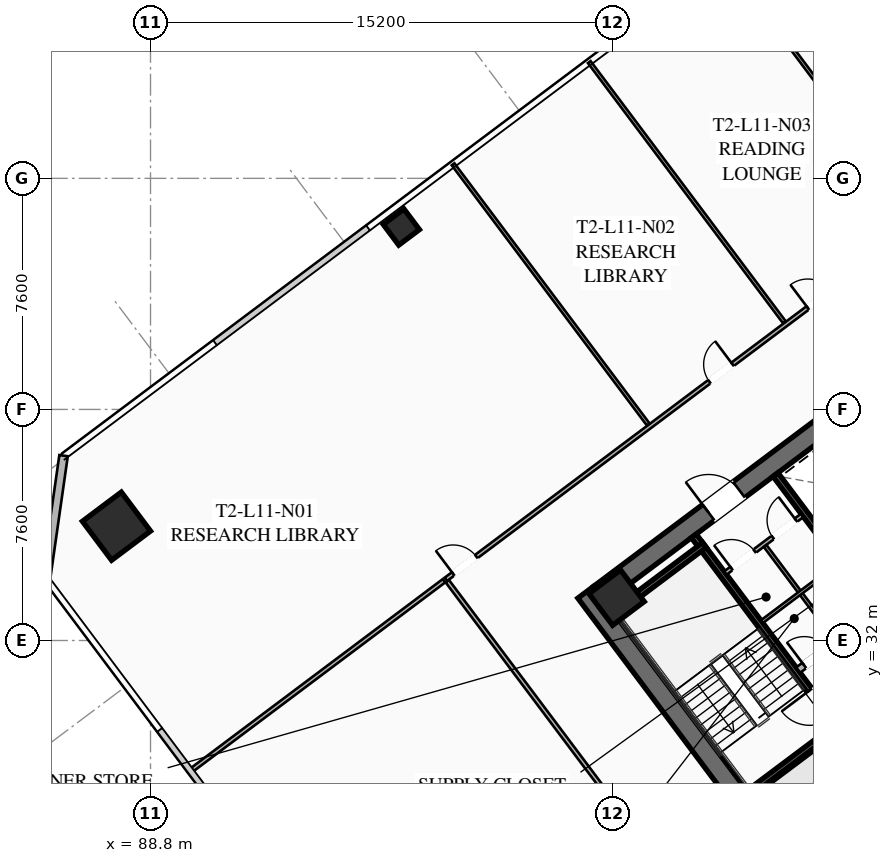
"""IFC4 building model, lengths in metres.
Left out: names, types, materials, properties, quantities, classifications, styles, units other than length and angle.
Written with IfcOpenShell. Run it as: python <this file> out.ifc"""

import sys

from ifc_helpers import new_model, si_unit, direction, frame, frame_2d, origin, origin_2d, place, context, subcontext, project, spatial, rectangle, hollow_rectangle, extrude, element, fill, save


model = new_model("IFC4")
c1 = context("Model", 3, precision=1e-05, world=origin(), true_north=direction((0.0, 1.0)))
c2 = subcontext(c1, "Body", "Model", "MODEL_VIEW")
j1 = project(units=[si_unit("LENGTHUNIT", "METRE"), si_unit("PLANEANGLEUNIT", "RADIAN")], contexts=[c1])
p1 = place(None, origin())
s1 = spatial("IfcSite", under=j1, at=p1, CompositionType="ELEMENT")
p2 = place(p1, origin())
s2 = spatial("IfcBuilding", under=s1, at=p2, CompositionType="ELEMENT")
p3 = place(p2, frame((0.0, 0.0, 45.9)))
s3 = spatial("IfcBuildingStorey", under=s2, at=p3, CompositionType="ELEMENT", Elevation=45.9)
p4 = place(p3, frame((112.476, 21.107, 0.0), z_axis=(0.0, 0.0, 1.0), x_axis=(-0.600005007985, 0.799996243986, 0.0)))
e1 = element("IfcWall", 1, at=p4, inside=s3, PredefinedType="SHEAR", context=c2, shape_type="SweptSolid", body=[
    extrude(rectangle(XDim=15.6, YDim=0.65, at=frame_2d((7.8, 0.0))), origin(), (0.0, 0.0, 1.0), 3.55),
])
p5 = place(p3, frame((103.571, 33.522, 0.0), z_axis=(0.0, 0.0, 1.0), x_axis=(0.799998028465, 0.600002628705, 0.0)))
e2 = element("IfcWall", 2, at=p5, inside=s3, PredefinedType="SHEAR", context=c2, shape_type="SweptSolid", body=[
    extrude(rectangle(XDim=14.86, YDim=0.65, at=frame_2d((7.43, 0.0))), origin(), (0.0, 0.0, 1.0), 3.55),
])
p6 = place(p5, frame((4.48, 0.0, 0.0)))
e3 = element("IfcOpeningElement", 3, at=p6, cuts=e2, PredefinedType="OPENING", context=c2, shape_type="SweptSolid", body=[
    extrude(rectangle(XDim=1.25, YDim=2.25, at=frame_2d((0.625, 1.125))), frame((0.0, 0.335, 0.0), z_axis=(0.0, -1.0, 0.0), x_axis=(1.0, 0.0, 0.0)), (0.0, 0.0, 1.0), 0.67),
])
p7 = place(p5, frame((9.53, 0.0, 0.0)))
e4 = element("IfcOpeningElement", 4, at=p7, cuts=e2, PredefinedType="OPENING", context=c2, shape_type="SweptSolid", body=[
    extrude(rectangle(XDim=1.25, YDim=2.25, at=frame_2d((0.625, 1.125))), frame((0.0, 0.335, 0.0), z_axis=(0.0, -1.0, 0.0), x_axis=(1.0, 0.0, 0.0)), (0.0, 0.0, 1.0), 0.67),
])
p8 = place(p3, frame((104.13, 33.41, 0.0), z_axis=(0.0, 0.0, 1.0), x_axis=(0.799999996291, 0.600000004945, 0.0)))
e5 = element("IfcColumn", 5, at=p8, inside=s3, PredefinedType="COLUMN", context=c2, shape_type="SweptSolid", body=[
    extrude(hollow_rectangle(XDim=1.3, YDim=1.3, WallThickness=0.05, at=origin_2d()), origin(), (0.0, 0.0, 1.0), 3.35),
])
p9 = place(p3, frame((87.68, 35.76, 0.0), z_axis=(0.0, 0.0, 1.0), x_axis=(0.799999996291, 0.600000004945, 0.0)))
e6 = element("IfcColumn", 6, at=p9, inside=s3, PredefinedType="COLUMN", context=c2, shape_type="SweptSolid", body=[
    extrude(hollow_rectangle(XDim=1.6, YDim=1.6, WallThickness=0.06, at=origin_2d()), origin(), (0.0, 0.0, 1.0), 3.35),
])
p10 = place(p3, frame((97.05, 45.6, 0.0), z_axis=(0.0, 0.0, 1.0), x_axis=(0.799999996291, 0.600000004945, 0.0)))
e7 = element("IfcColumn", 7, at=p10, inside=s3, PredefinedType="COLUMN", context=c2, shape_type="SweptSolid", body=[
    extrude(hollow_rectangle(XDim=0.85, YDim=0.85, WallThickness=0.035, at=origin_2d()), origin(), (0.0, 0.0, 1.0), 3.35),
])
p11 = place(p3, frame((85.36, 34.02, 0.0), z_axis=(0.0, 0.0, 1.0), x_axis=(0.14137968631, 0.989955445613, 0.0)))
e8 = element("IfcWall", 8, at=p11, inside=s3, PredefinedType="SOLIDWALL", context=c2, shape_type="SweptSolid", body=[
    extrude(rectangle(XDim=4.101, YDim=0.28, at=frame_2d((2.051, 0.0))), origin(), (0.0, 0.0, 1.0), 3.35),
])
p12 = place(p3, frame((111.44, 29.08, 0.0), z_axis=(0.0, 0.0, 1.0), x_axis=(-0.600009827119, 0.799992629566, 0.0)))
e9 = element("IfcWall", 9, at=p12, inside=s3, PredefinedType="SHEAR", context=c2, shape_type="SweptSolid", body=[
    extrude(rectangle(XDim=7.95, YDim=0.2, at=frame_2d((3.975, 0.0))), origin(), (0.0, 0.0, 1.0), 3.35),
])
p13 = place(p12, frame((0.45, 0.0, 0.0)))
e10 = element("IfcOpeningElement", 10, at=p13, cuts=e9, PredefinedType="OPENING", context=c2, shape_type="SweptSolid", body=[
    extrude(rectangle(XDim=1.15, YDim=2.2, at=frame_2d((0.575, 1.1))), frame((0.0, 0.11, 0.0), z_axis=(0.0, -1.0, 0.0), x_axis=(1.0, 0.0, 0.0)), (0.0, 0.0, 1.0), 0.22),
])
for number, where, z_axis, x_axis in (
    (11, (108.476, 26.982, 0.0), (0.0, 0.0, 1.0), (0.8, 0.6, 0.0)),
    (12, (104.036, 32.902, 0.0), (0.0, 0.0, 1.0), (0.8, 0.6, 0.0)),
):
    element("IfcWall", number, at=place(p3, frame(where, z_axis=z_axis, x_axis=x_axis)), inside=s3, PredefinedType="SHEAR", context=c2, shape_type="SweptSolid", body=[
        extrude(rectangle(XDim=3.73, YDim=0.2, at=frame_2d((1.865, 0.0))), origin(), (0.0, 0.0, 1.0), 3.35),
    ])
p14 = place(p3, frame((117.938, 26.016, 0.0), z_axis=(0.0, 0.0, 1.0), x_axis=(-0.600005463273, 0.799995902516, 0.0)))
e13 = element("IfcWall", 13, at=p14, inside=s3, PredefinedType="SHEAR", context=c2, shape_type="SweptSolid", body=[
    extrude(rectangle(XDim=14.3, YDim=0.2, at=frame_2d((7.15, 0.0))), origin(), (0.0, 0.0, 1.0), 3.35),
])
p15 = place(p3, frame((110.104, 31.028, 0.0), z_axis=(0.0, 0.0, 1.0), x_axis=(0.800018601094, 0.59997519774, 0.0)))
e14 = element("IfcWall", 14, at=p15, inside=s3, PredefinedType="SOLIDWALL", context=c2, shape_type="SweptSolid", body=[
    extrude(rectangle(XDim=3.15, YDim=0.22, at=frame_2d((1.575, 0.0))), origin(), (0.0, 0.0, 1.0), 2.703),
])
p16 = place(p15, frame((0.25, 0.0, 0.0)))
e15 = element("IfcOpeningElement", 15, at=p16, cuts=e14, PredefinedType="OPENING", context=c2, shape_type="SweptSolid", body=[
    extrude(rectangle(XDim=0.95, YDim=2.05, at=frame_2d((0.475, 1.025))), frame((0.0, 0.12, 0.0), z_axis=(0.0, -1.0, 0.0), x_axis=(1.0, 0.0, 0.0)), (0.0, 0.0, 1.0), 0.24),
])
p17 = place(p15, frame((1.95, 0.0, 0.0)))
e16 = element("IfcOpeningElement", 16, at=p17, cuts=e14, PredefinedType="OPENING", context=c2, shape_type="SweptSolid", body=[
    extrude(rectangle(XDim=0.95, YDim=2.05, at=frame_2d((0.475, 1.025))), frame((0.0, 0.12, 0.0), z_axis=(0.0, -1.0, 0.0), x_axis=(1.0, 0.0, 0.0)), (0.0, 0.0, 1.0), 0.24),
])
p18 = place(p3, frame((109.688, 25.366, 0.0), z_axis=(0.0, 0.0, 1.0), x_axis=(0.8, 0.6, 0.0)))
e17 = element("IfcWall", 17, at=p18, inside=s3, PredefinedType="SOLIDWALL", context=c2, shape_type="SweptSolid", body=[
    extrude(rectangle(XDim=3.38, YDim=0.2, at=frame_2d((1.69, 0.0))), origin(), (0.0, 0.0, 1.0), 3.35),
])
p19 = place(p3, frame((107.71, 34.22, 0.0), z_axis=(0.0, 0.0, 1.0), x_axis=(0.799981399002, 0.60002480053, 0.0)))
e18 = element("IfcWall", 18, at=p19, inside=s3, PredefinedType="PARTITIONING", context=c2, shape_type="SweptSolid", body=[
    extrude(rectangle(XDim=3.15, YDim=0.135, at=frame_2d((1.575, 0.0))), origin(), (0.0, 0.0, 1.0), 2.703),
])
p20 = place(p19, frame((0.25, 0.0, 0.0)))
e19 = element("IfcOpeningElement", 19, at=p20, cuts=e18, PredefinedType="OPENING", context=c2, shape_type="SweptSolid", body=[
    extrude(rectangle(XDim=0.95, YDim=2.05, at=frame_2d((0.475, 1.025))), frame((0.0, 0.077, 0.0), z_axis=(0.0, -1.0, 0.0), x_axis=(1.0, 0.0, 0.0)), (0.0, 0.0, 1.0), 0.155),
])
p21 = place(p19, frame((1.95, 0.0, 0.0)))
e20 = element("IfcOpeningElement", 20, at=p21, cuts=e18, PredefinedType="OPENING", context=c2, shape_type="SweptSolid", body=[
    extrude(rectangle(XDim=0.95, YDim=2.05, at=frame_2d((0.475, 1.025))), frame((0.0, 0.077, 0.0), z_axis=(0.0, -1.0, 0.0), x_axis=(1.0, 0.0, 0.0)), (0.0, 0.0, 1.0), 0.155),
])
p22 = place(p3, frame((111.296, 32.072, 0.0), z_axis=(0.0, 0.0, 1.0), x_axis=(-0.59995887973, 0.800030838552, 0.0)))
e21 = element("IfcWall", 21, at=p22, inside=s3, PredefinedType="PARTITIONING", context=c2, shape_type="SweptSolid", body=[
    extrude(rectangle(XDim=3.8, YDim=0.11, at=frame_2d((1.9, 0.0))), origin(), (0.0, 0.0, 1.0), 2.703),
])
p23 = place(p3, frame((108.91, 32.62, 0.0), z_axis=(0.0, 0.0, 1.0), x_axis=(0.800018601094, 0.59997519774, 0.0)))
e22 = element("IfcWall", 22, at=p23, inside=s3, PredefinedType="PARTITIONING", context=c2, shape_type="SweptSolid", body=[
    extrude(rectangle(XDim=3.15, YDim=0.11, at=frame_2d((1.575, 0.0))), origin(), (0.0, 0.0, 1.0), 2.703),
])
p24 = place(p3, frame((98.516, 34.012, 0.0), z_axis=(0.0, 0.0, 1.0), x_axis=(0.799998035726, 0.600002619023, 0.0)))
e23 = element("IfcWall", 23, at=p24, inside=s3, PredefinedType="PARTITIONING", context=c2, shape_type="SweptSolid", body=[
    extrude(rectangle(XDim=29.83, YDim=0.135, at=frame_2d((14.915, 0.0))), origin(), (0.0, 0.0, 1.0), 2.703),
])
p25 = place(p24, frame((0.3, 0.0, 0.0)))
e24 = element("IfcOpeningElement", 24, at=p25, cuts=e23, PredefinedType="OPENING", context=c2, shape_type="SweptSolid", body=[
    extrude(rectangle(XDim=0.95, YDim=2.05, at=frame_2d((0.475, 1.025))), frame((0.0, 0.077, 0.0), z_axis=(0.0, -1.0, 0.0), x_axis=(1.0, 0.0, 0.0)), (0.0, 0.0, 1.0), 0.155),
])
p26 = place(p24, frame((10.835, 0.0, 0.0)))
e25 = element("IfcOpeningElement", 25, at=p26, cuts=e23, PredefinedType="OPENING", context=c2, shape_type="SweptSolid", body=[
    extrude(rectangle(XDim=0.95, YDim=2.05, at=frame_2d((0.475, 1.025))), frame((0.0, 0.077, 0.0), z_axis=(0.0, -1.0, 0.0), x_axis=(1.0, 0.0, 0.0)), (0.0, 0.0, 1.0), 0.155),
])
p27 = place(p24, frame((14.879, 0.0, 0.0)))
e26 = element("IfcOpeningElement", 26, at=p27, cuts=e23, PredefinedType="OPENING", context=c2, shape_type="SweptSolid", body=[
    extrude(rectangle(XDim=0.95, YDim=2.05, at=frame_2d((0.475, 1.025))), frame((0.0, 0.077, 0.0), z_axis=(0.0, -1.0, 0.0), x_axis=(1.0, 0.0, 0.0)), (0.0, 0.0, 1.0), 0.155),
])
p28 = place(p24, frame((28.58, 0.0, 0.0)))
e27 = element("IfcOpeningElement", 27, at=p28, cuts=e23, PredefinedType="OPENING", context=c2, shape_type="SweptSolid", body=[
    extrude(rectangle(XDim=0.95, YDim=2.05, at=frame_2d((0.475, 1.025))), frame((0.0, 0.077, 0.0), z_axis=(0.0, -1.0, 0.0), x_axis=(1.0, 0.0, 0.0)), (0.0, 0.0, 1.0), 0.155),
])
p29 = place(p3, frame((105.172, 39.104, 0.0), z_axis=(0.0, 0.0, 1.0), x_axis=(-0.600007301277, 0.79999452399, 0.0)))
e28 = element("IfcWall", 28, at=p29, inside=s3, PredefinedType="PARTITIONING", context=c2, shape_type="SweptSolid", body=[
    extrude(rectangle(XDim=10.7, YDim=0.11, at=frame_2d((5.35, 0.0))), origin(), (0.0, 0.0, 1.0), 2.703),
])
p30 = place(p3, frame((109.652, 42.464, 0.0), z_axis=(0.0, 0.0, 1.0), x_axis=(-0.600018253432, 0.799986309601, 0.0)))
e29 = element("IfcWall", 29, at=p30, inside=s3, PredefinedType="PARTITIONING", context=c2, shape_type="SweptSolid", body=[
    extrude(rectangle(XDim=10.7, YDim=0.11, at=frame_2d((5.35, 0.0))), origin(), (0.0, 0.0, 1.0), 2.703),
])
p31 = place(p3, frame((114.132, 45.824, 0.0), z_axis=(0.0, 0.0, 1.0), x_axis=(-0.600007301277, 0.79999452399, 0.0)))
e30 = element("IfcWall", 30, at=p31, inside=s3, PredefinedType="PARTITIONING", context=c2, shape_type="SweptSolid", body=[
    extrude(rectangle(XDim=10.7, YDim=0.11, at=frame_2d((5.35, 0.0))), origin(), (0.0, 0.0, 1.0), 2.703),
])
p32 = place(p3, frame((111.548, 16.636, 0.0), z_axis=(0.0, 0.0, 1.0), x_axis=(-0.600003610192, 0.799997292343, 0.0)))
e31 = element("IfcWall", 31, at=p32, inside=s3, PredefinedType="PARTITIONING", context=c2, shape_type="SweptSolid", body=[
    extrude(rectangle(XDim=21.64, YDim=0.135, at=frame_2d((10.82, 0.0))), origin(), (0.0, 0.0, 1.0), 2.703),
])
p33 = place(p32, frame((0.3, 0.0, 0.0)))
e32 = element("IfcOpeningElement", 32, at=p33, cuts=e31, PredefinedType="OPENING", context=c2, shape_type="SweptSolid", body=[
    extrude(rectangle(XDim=0.95, YDim=2.05, at=frame_2d((0.475, 1.025))), frame((0.0, 0.077, 0.0), z_axis=(0.0, -1.0, 0.0), x_axis=(1.0, 0.0, 0.0)), (0.0, 0.0, 1.0), 0.155),
])
p34 = place(p3, frame((98.452, 33.964, 0.0), z_axis=(0.0, 0.0, 1.0), x_axis=(-0.799988753532, -0.600014994998, 0.0)))
e33 = element("IfcWall", 33, at=p34, inside=s3, PredefinedType="PARTITIONING", context=c2, shape_type="SweptSolid", body=[
    extrude(rectangle(XDim=10.42, YDim=0.135, at=frame_2d((5.21, 0.0))), origin(), (0.0, 0.0, 1.0), 2.703),
])
p35 = place(p6, origin())
e34 = element("IfcDoor", 34, at=p35, inside=s3, OperationType="SINGLE_SWING_LEFT", PredefinedType="DOOR", context=c2, shape_type="SweptSolid", body=[
    extrude(rectangle(XDim=1.25, YDim=2.25, at=frame_2d((0.625, 1.125))), frame((0.0, 0.025, 0.0), z_axis=(0.0, -1.0, 0.0), x_axis=(1.0, 0.0, 0.0)), (0.0, 0.0, 1.0), 0.05),
])
fill(e3, e34)
p36 = place(p13, origin())
e35 = element("IfcDoor", 35, at=p36, inside=s3, OperationType="SINGLE_SWING_RIGHT", PredefinedType="DOOR", context=c2, shape_type="SweptSolid", body=[
    extrude(rectangle(XDim=1.15, YDim=2.2, at=frame_2d((0.575, 1.1))), frame((0.0, 0.025, 0.0), z_axis=(0.0, -1.0, 0.0), x_axis=(1.0, 0.0, 0.0)), (0.0, 0.0, 1.0), 0.05),
])
fill(e10, e35)
p37 = place(p20, origin())
e36 = element("IfcDoor", 36, at=p37, inside=s3, OperationType="SINGLE_SWING_LEFT", PredefinedType="DOOR", context=c2, shape_type="SweptSolid", body=[
    extrude(rectangle(XDim=0.95, YDim=2.05, at=frame_2d((0.475, 1.025))), frame((0.0, 0.025, 0.0), z_axis=(0.0, -1.0, 0.0), x_axis=(1.0, 0.0, 0.0)), (0.0, 0.0, 1.0), 0.05),
])
fill(e19, e36)
p38 = place(p21, origin())
e37 = element("IfcDoor", 37, at=p38, inside=s3, OperationType="SINGLE_SWING_RIGHT", PredefinedType="DOOR", context=c2, shape_type="SweptSolid", body=[
    extrude(rectangle(XDim=0.95, YDim=2.05, at=frame_2d((0.475, 1.025))), frame((0.0, 0.025, 0.0), z_axis=(0.0, -1.0, 0.0), x_axis=(1.0, 0.0, 0.0)), (0.0, 0.0, 1.0), 0.05),
])
fill(e20, e37)
p39 = place(p16, origin())
e38 = element("IfcDoor", 38, at=p39, inside=s3, OperationType="SINGLE_SWING_LEFT", PredefinedType="DOOR", context=c2, shape_type="SweptSolid", body=[
    extrude(rectangle(XDim=0.95, YDim=2.05, at=frame_2d((0.475, 1.025))), frame((0.0, 0.025, 0.0), z_axis=(0.0, -1.0, 0.0), x_axis=(1.0, 0.0, 0.0)), (0.0, 0.0, 1.0), 0.05),
])
fill(e15, e38)
p40 = place(p25, origin())
e39 = element("IfcDoor", 39, at=p40, inside=s3, OperationType="SINGLE_SWING_LEFT", PredefinedType="DOOR", context=c2, shape_type="SweptSolid", body=[
    extrude(rectangle(XDim=0.95, YDim=2.05, at=frame_2d((0.475, 1.025))), frame((0.0, 0.025, 0.0), z_axis=(0.0, -1.0, 0.0), x_axis=(1.0, 0.0, 0.0)), (0.0, 0.0, 1.0), 0.05),
])
fill(e24, e39)
p41 = place(p26, origin())
e40 = element("IfcDoor", 40, at=p41, inside=s3, OperationType="SINGLE_SWING_RIGHT", PredefinedType="DOOR", context=c2, shape_type="SweptSolid", body=[
    extrude(rectangle(XDim=0.95, YDim=2.05, at=frame_2d((0.475, 1.025))), frame((0.0, 0.025, 0.0), z_axis=(0.0, -1.0, 0.0), x_axis=(1.0, 0.0, 0.0)), (0.0, 0.0, 1.0), 0.05),
])
fill(e25, e40)
p42 = place(p27, origin())
e41 = element("IfcDoor", 41, at=p42, inside=s3, OperationType="SINGLE_SWING_LEFT", PredefinedType="DOOR", context=c2, shape_type="SweptSolid", body=[
    extrude(rectangle(XDim=0.95, YDim=2.05, at=frame_2d((0.475, 1.025))), frame((0.0, 0.025, 0.0), z_axis=(0.0, -1.0, 0.0), x_axis=(1.0, 0.0, 0.0)), (0.0, 0.0, 1.0), 0.05),
])
fill(e26, e41)
save(model, sys.argv[1])
